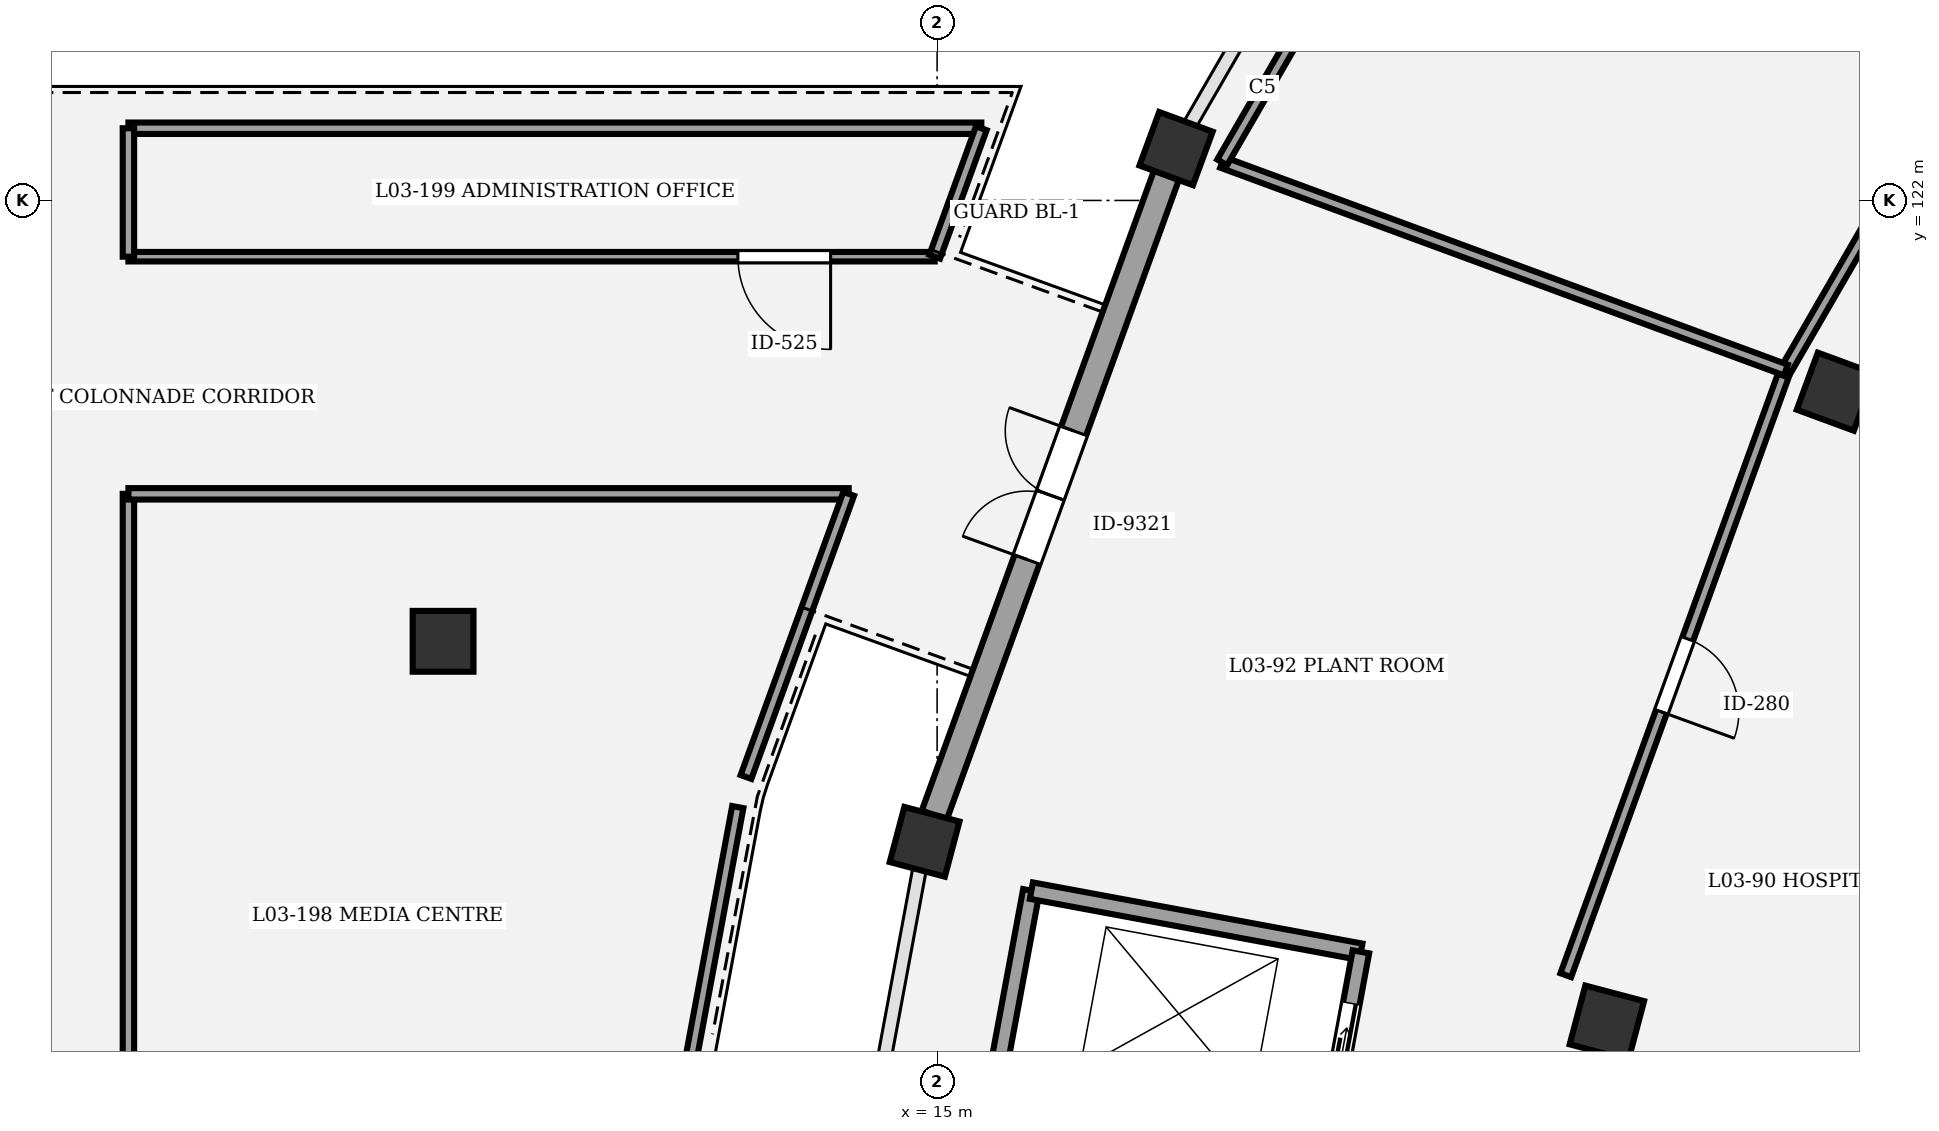
"""IFC4 building model, lengths in metres.
Left out: names, types, materials, properties, quantities, classifications, styles, units other than length and angle.
Written with IfcOpenShell. Run it as: python <this file> out.ifc"""

import sys

from ifc_helpers import new_model, si_unit, direction, frame, frame_2d, origin, origin_2d, place, context, subcontext, project, spatial, rectangle, circle, extrude, element, fill, save


model = new_model("IFC4")
c1 = context("Model", 3, precision=1e-05, world=origin(), true_north=direction((0.0, 1.0)))
c2 = subcontext(c1, "Body", "Model", "MODEL_VIEW")
j1 = project(units=[si_unit("LENGTHUNIT", "METRE"), si_unit("PLANEANGLEUNIT", "RADIAN")], contexts=[c1])
p1 = place(None, origin())
s1 = spatial("IfcSite", under=j1, at=p1, CompositionType="ELEMENT")
p2 = place(p1, origin())
s2 = spatial("IfcBuilding", under=s1, at=p2, CompositionType="ELEMENT")
p3 = place(p2, frame((0.0, 0.0, 14.7)))
s3 = spatial("IfcBuildingStorey", under=s2, at=p3, CompositionType="ELEMENT", Elevation=14.7)
p4 = place(p3, frame((26.824, 119.484, 0.0), z_axis=(0.0, 0.0, 1.0), x_axis=(-0.938372433776, 0.34562577382, 0.0)))
e1 = element("IfcColumn", 1, at=p4, inside=s3, PredefinedType="COLUMN", context=c2, shape_type="SweptSolid", body=[
    extrude(rectangle(XDim=0.8, YDim=0.8, at=origin_2d()), origin(), (0.0, 0.0, 1.0), 4.5),
])
p5 = place(p3, frame((18.144, 122.682, 0.0), z_axis=(0.0, 0.0, 1.0), x_axis=(-0.938372433776, 0.34562577382, 0.0)))
e2 = element("IfcColumn", 2, at=p5, inside=s3, PredefinedType="COLUMN", context=c2, shape_type="SweptSolid", body=[
    extrude(rectangle(XDim=0.75, YDim=0.75, at=origin_2d()), origin(), (0.0, 0.0, 1.0), 4.5),
])
p6 = place(p3, frame((23.812, 111.182, 0.0), z_axis=(0.0, 0.0, 1.0), x_axis=(-0.966600102017, 0.256289373133, 0.0)))
e3 = element("IfcColumn", 3, at=p6, inside=s3, PredefinedType="COLUMN", context=c2, shape_type="SweptSolid", body=[
    extrude(rectangle(XDim=0.8, YDim=0.8, at=origin_2d()), origin(), (0.0, 0.0, 1.0), 4.5),
])
p7 = place(p3, frame((14.835, 113.562, 0.0), z_axis=(0.0, 0.0, 1.0), x_axis=(-0.966600102017, 0.256289373133, 0.0)))
e4 = element("IfcColumn", 4, at=p7, inside=s3, PredefinedType="COLUMN", context=c2, shape_type="SweptSolid", body=[
    extrude(rectangle(XDim=0.75, YDim=0.75, at=origin_2d()), origin(), (0.0, 0.0, 1.0), 4.5),
])
p8 = place(p3, frame((8.5, 116.2, 0.0), z_axis=(0.0, 0.0, 1.0), x_axis=(1.0, 0.0, 0.0)))
e5 = element("IfcColumn", 5, at=p8, inside=s3, PredefinedType="COLUMN", context=c2, shape_type="SweptSolid", body=[
    extrude(circle(Radius=0.4, at=origin_2d()), origin(), (0.0, 0.0, 1.0), 4.5),
])
p9 = place(p3, frame((14.963, 113.913, 0.0), z_axis=(0.0, 0.0, 1.0), x_axis=(0.341014063491, 0.94005819421, 0.0)))
e6 = element("IfcWall", 6, at=p9, inside=s3, PredefinedType="STANDARD", context=c2, shape_type="SweptSolid", body=[
    extrude(rectangle(XDim=8.956, YDim=0.35, at=frame_2d((4.478, 0.0))), origin(), (0.0, 0.0, 1.0), 3.42),
])
p10 = place(p9, frame((3.578, 0.0, 0.0)))
e7 = element("IfcOpeningElement", 7, at=p10, cuts=e6, PredefinedType="OPENING", context=c2, shape_type="SweptSolid", body=[
    extrude(rectangle(XDim=1.8, YDim=2.4, at=frame_2d((0.9, 1.2))), frame((0.0, 0.185, 0.0), z_axis=(0.0, -1.0, 0.0), x_axis=(1.0, 0.0, 0.0)), (0.0, 0.0, 1.0), 0.37),
])
p11 = place(p3, frame((14.228, 102.085, 0.0), z_axis=(0.0, 0.0, 1.0), x_axis=(0.182574755222, 0.983191974517, 0.0)))
e8 = element("IfcWall", 8, at=p11, inside=s3, PredefinedType="SHEAR", context=c2, shape_type="SweptSolid", body=[
    extrude(rectangle(XDim=11.02, YDim=0.22, at=frame_2d((5.51, 0.0))), origin(), (0.0, 0.0, 1.0), 4.25),
])
p12 = place(p3, frame((20.576, 112.115, 0.0), z_axis=(0.0, 0.0, 1.0), x_axis=(-0.983189729951, 0.18258684213, 0.0)))
e9 = element("IfcWall", 9, at=p12, inside=s3, PredefinedType="SHEAR", context=c2, shape_type="SweptSolid", body=[
    extrude(rectangle(XDim=4.41, YDim=0.22, at=frame_2d((2.205, 0.0))), origin(), (0.0, 0.0, 1.0), 4.25),
])
p13 = place(p3, frame((18.564, 101.28, 0.0), z_axis=(0.0, 0.0, 1.0), x_axis=(0.182570778451, 0.983192712979, 0.0)))
e10 = element("IfcWall", 10, at=p13, inside=s3, PredefinedType="SHEAR", context=c2, shape_type="SweptSolid", body=[
    extrude(rectangle(XDim=11.02, YDim=0.22, at=frame_2d((5.51, 0.0))), origin(), (0.0, 0.0, 1.0), 4.25),
])
p14 = place(p13, frame((0.3, 0.0, 0.0)))
e11 = element("IfcOpeningElement", 11, at=p14, cuts=e10, PredefinedType="OPENING", context=c2, shape_type="SweptSolid", body=[
    extrude(rectangle(XDim=1.15, YDim=2.15, at=frame_2d((0.575, 1.075))), frame((0.0, 0.12, 0.0), z_axis=(0.0, -1.0, 0.0), x_axis=(1.0, 0.0, 0.0)), (0.0, 0.0, 1.0), 0.24),
])
p15 = place(p13, frame((9.23, 0.0, 0.0)))
e12 = element("IfcOpeningElement", 12, at=p15, cuts=e10, PredefinedType="OPENING", context=c2, shape_type="SweptSolid", body=[
    extrude(rectangle(XDim=1.1, YDim=2.15, at=frame_2d((0.55, 1.075))), frame((0.0, 0.12, 0.0), z_axis=(0.0, -1.0, 0.0), x_axis=(1.0, 0.0, 0.0)), (0.0, 0.0, 1.0), 0.24),
])
p16 = place(p3, frame((30.359, 127.019, 0.0), z_axis=(0.0, 0.0, 1.0), x_axis=(-0.500559280672, -0.865702262059, 0.0)))
e13 = element("IfcWall", 13, at=p16, inside=s3, PredefinedType="PARTITIONING", context=c2, shape_type="SweptSolid", body=[
    extrude(rectangle(XDim=8.375, YDim=0.15, at=frame_2d((4.187, 0.0))), origin(), (0.0, 0.0, 1.0), 3.25),
])
p17 = place(p16, frame((3.717, 0.0, 0.0)))
e14 = element("IfcOpeningElement", 14, at=p17, cuts=e13, PredefinedType="OPENING", context=c2, shape_type="SweptSolid", body=[
    extrude(rectangle(XDim=0.94, YDim=2.3, at=frame_2d((0.47, 1.15))), frame((0.0, 0.085, 0.0), z_axis=(0.0, -1.0, 0.0), x_axis=(1.0, 0.0, 0.0)), (0.0, 0.0, 1.0), 0.17),
])
p18 = place(p3, frame((26.134, 119.696, 0.0), z_axis=(0.0, 0.0, 1.0), x_axis=(-0.341044550343, -0.940047134287, 0.0)))
e15 = element("IfcWall", 15, at=p18, inside=s3, PredefinedType="PARTITIONING", context=c2, shape_type="SweptSolid", body=[
    extrude(rectangle(XDim=8.392, YDim=0.15, at=frame_2d((4.196, 0.0))), origin(), (0.0, 0.0, 1.0), 3.25),
])
p19 = place(p18, frame((3.686, 0.0, 0.0)))
e16 = element("IfcOpeningElement", 16, at=p19, cuts=e15, PredefinedType="OPENING", context=c2, shape_type="SweptSolid", body=[
    extrude(rectangle(XDim=1.02, YDim=2.3, at=frame_2d((0.51, 1.15))), frame((0.0, 0.085, 0.0), z_axis=(0.0, -1.0, 0.0), x_axis=(1.0, 0.0, 0.0)), (0.0, 0.0, 1.0), 0.17),
])
p20 = place(p3, frame((4.36, 99.45, 0.0), z_axis=(0.0, 0.0, 1.0), x_axis=(0.0, 1.0, 0.0)))
e17 = element("IfcWall", 17, at=p20, inside=s3, PredefinedType="PARTITIONING", context=c2, shape_type="SweptSolid", body=[
    extrude(rectangle(XDim=18.69, YDim=0.15, at=frame_2d((9.345, 0.0))), origin(), (0.0, 0.0, 1.0), 3.25),
])
p21 = place(p20, frame((6.225, 0.0, 0.0)))
e18 = element("IfcOpeningElement", 18, at=p21, cuts=e17, PredefinedType="OPENING", context=c2, shape_type="SweptSolid", body=[
    extrude(rectangle(XDim=1.18, YDim=2.2, at=frame_2d((0.59, 1.1))), frame((0.0, 0.085, 0.0), z_axis=(0.0, -1.0, 0.0), x_axis=(1.0, 0.0, 0.0)), (0.0, 0.0, 1.0), 0.17),
])
p22 = place(p3, frame((14.969, 121.26, 0.0), z_axis=(0.0, 0.0, 1.0), x_axis=(-1.0, 0.0, 0.0)))
e19 = element("IfcWall", 19, at=p22, inside=s3, PredefinedType="PARTITIONING", context=c2, shape_type="SweptSolid", body=[
    extrude(rectangle(XDim=10.608, YDim=0.125, at=frame_2d((5.304, 0.0))), origin(), (0.0, 0.0, 1.0), 3.25),
])
p23 = place(p22, frame((1.37, 0.0, 0.0)))
e20 = element("IfcOpeningElement", 20, at=p23, cuts=e19, PredefinedType="OPENING", context=c2, shape_type="SweptSolid", body=[
    extrude(rectangle(XDim=1.22, YDim=2.2, at=frame_2d((0.61, 1.1))), frame((0.0, 0.073, 0.0), z_axis=(0.0, -1.0, 0.0), x_axis=(1.0, 0.0, 0.0)), (0.0, 0.0, 1.0), 0.145),
])
p24 = place(p3, frame((26.167, 119.769, 0.0), z_axis=(0.0, 0.0, 1.0), x_axis=(-0.938352081903, 0.34568102405, 0.0)))
e21 = element("IfcWall", 21, at=p24, inside=s3, PredefinedType="PARTITIONING", context=c2, shape_type="SweptSolid", body=[
    extrude(rectangle(XDim=7.904, YDim=0.15, at=frame_2d((3.952, 0.0))), origin(), (0.0, 0.0, 1.0), 3.25),
])
p25 = place(p3, frame((18.75, 122.501, 0.0), z_axis=(0.0, 0.0, 1.0), x_axis=(0.500574107164, 0.865693689036, 0.0)))
e22 = element("IfcWall", 22, at=p25, inside=s3, PredefinedType="PARTITIONING", context=c2, shape_type="SweptSolid", body=[
    extrude(rectangle(XDim=9.08, YDim=0.15, at=frame_2d((4.54, 0.0))), origin(), (0.0, 0.0, 1.0), 3.25),
])
p26 = place(p3, frame((12.377, 114.019, 0.0), z_axis=(0.0, 0.0, 1.0), x_axis=(-0.182620957058, -0.983183393901, 0.0)))
e23 = element("IfcWall", 23, at=p26, inside=s3, PredefinedType="PARTITIONING", context=c2, shape_type="SweptSolid", body=[
    extrude(rectangle(XDim=10.901, YDim=0.15, at=frame_2d((5.45, 0.0))), origin(), (0.0, 0.0, 1.0), 3.25),
])
p27 = place(p3, frame((4.36, 118.14, 0.0), z_axis=(0.0, 0.0, 1.0), x_axis=(1.0, 0.0, 0.0)))
e24 = element("IfcWall", 24, at=p27, inside=s3, PredefinedType="PARTITIONING", context=c2, shape_type="SweptSolid", body=[
    extrude(rectangle(XDim=9.477, YDim=0.15, at=frame_2d((4.738, 0.0))), origin(), (0.0, 0.0, 1.0), 3.25),
])
p28 = place(p3, frame((13.837, 118.14, 0.0), z_axis=(0.0, 0.0, 1.0), x_axis=(-0.341035525383, -0.94005040845, 0.0)))
e25 = element("IfcWall", 25, at=p28, inside=s3, PredefinedType="PARTITIONING", context=c2, shape_type="SweptSolid", body=[
    extrude(rectangle(XDim=3.962, YDim=0.15, at=frame_2d((1.981, 0.0))), origin(), (0.0, 0.0, 1.0), 3.25),
])
p29 = place(p3, frame((4.36, 122.95, 0.0), z_axis=(0.0, 0.0, 1.0), x_axis=(1.0, 0.0, 0.0)))
e26 = element("IfcWall", 26, at=p29, inside=s3, PredefinedType="PARTITIONING", context=c2, shape_type="SweptSolid", body=[
    extrude(rectangle(XDim=11.221, YDim=0.15, at=frame_2d((5.611, 0.0))), origin(), (0.0, 0.0, 1.0), 3.25),
])
p30 = place(p3, frame((15.582, 122.95, 0.0), z_axis=(0.0, 0.0, 1.0), x_axis=(-0.341012375502, -0.940058806541, 0.0)))
e27 = element("IfcWall", 27, at=p30, inside=s3, PredefinedType="PARTITIONING", context=c2, shape_type="SweptSolid", body=[
    extrude(rectangle(XDim=1.798, YDim=0.15, at=frame_2d((0.899, 0.0))), origin(), (0.0, 0.0, 1.0), 3.25),
])
p31 = place(p3, frame((4.36, 121.26, 0.0), z_axis=(0.0, 0.0, 1.0), x_axis=(0.0, 1.0, 0.0)))
e28 = element("IfcWall", 28, at=p31, inside=s3, PredefinedType="PARTITIONING", context=c2, shape_type="SweptSolid", body=[
    extrude(rectangle(XDim=1.69, YDim=0.15, at=frame_2d((0.845, 0.0))), origin(), (0.0, 0.0, 1.0), 3.25),
])
p32 = place(p10, origin())
e29 = element("IfcDoor", 29, at=p32, inside=s3, OperationType="DOUBLE_DOOR_SINGLE_SWING", PredefinedType="DOOR", context=c2, shape_type="SweptSolid", body=[
    extrude(rectangle(XDim=1.8, YDim=2.4, at=frame_2d((0.9, 1.2))), frame((0.0, 0.025, 0.0), z_axis=(0.0, -1.0, 0.0), x_axis=(1.0, 0.0, 0.0)), (0.0, 0.0, 1.0), 0.05),
])
fill(e7, e29)
p33 = place(p15, origin())
e30 = element("IfcDoor", 30, at=p33, inside=s3, OperationType="DOUBLE_DOOR_SLIDING", PredefinedType="DOOR", context=c2, shape_type="SweptSolid", body=[
    extrude(rectangle(XDim=1.1, YDim=2.15, at=frame_2d((0.55, 1.075))), frame((0.0, 0.025, 0.0), z_axis=(0.0, -1.0, 0.0), x_axis=(1.0, 0.0, 0.0)), (0.0, 0.0, 1.0), 0.05),
])
fill(e12, e30)
p34 = place(p19, origin())
e31 = element("IfcDoor", 31, at=p34, inside=s3, OperationType="SINGLE_SWING_RIGHT", PredefinedType="DOOR", context=c2, shape_type="SweptSolid", body=[
    extrude(rectangle(XDim=1.02, YDim=2.3, at=frame_2d((0.51, 1.15))), frame((0.0, 0.025, 0.0), z_axis=(0.0, -1.0, 0.0), x_axis=(1.0, 0.0, 0.0)), (0.0, 0.0, 1.0), 0.05),
])
fill(e16, e31)
p35 = place(p23, origin())
e32 = element("IfcDoor", 32, at=p35, inside=s3, OperationType="SINGLE_SWING_LEFT", PredefinedType="DOOR", context=c2, shape_type="SweptSolid", body=[
    extrude(rectangle(XDim=1.22, YDim=2.2, at=frame_2d((0.61, 1.1))), frame((0.0, 0.025, 0.0), z_axis=(0.0, -1.0, 0.0), x_axis=(1.0, 0.0, 0.0)), (0.0, 0.0, 1.0), 0.05),
])
fill(e20, e32)
save(model, sys.argv[1])
